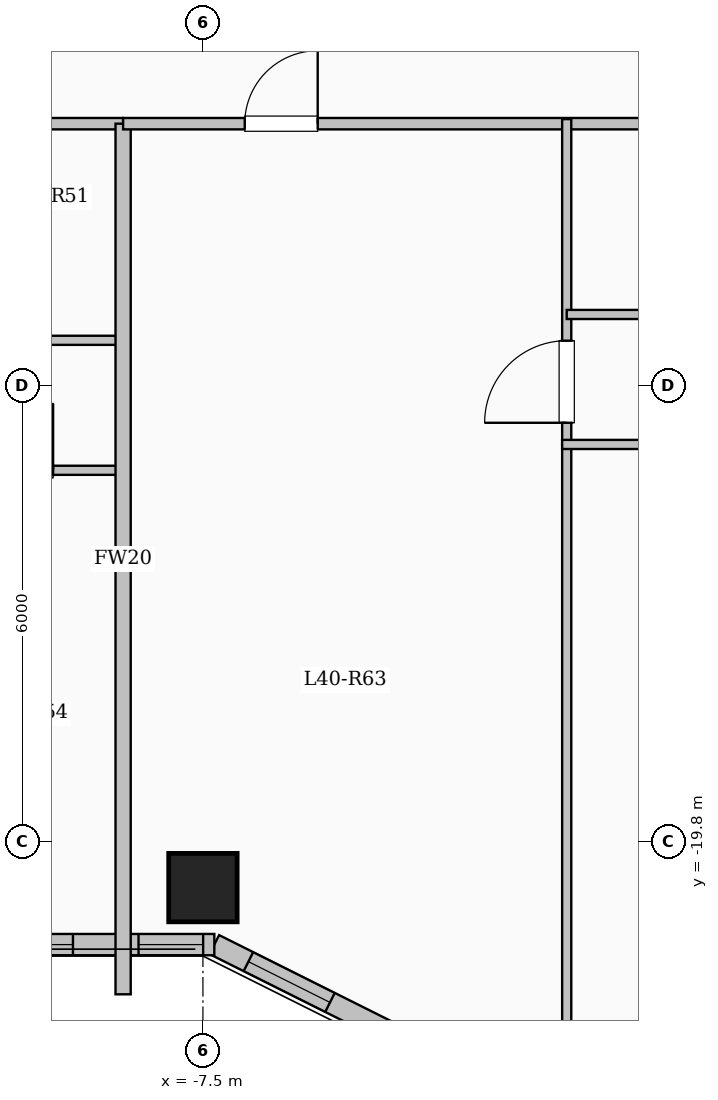
"""IFC4 building model, lengths in metres.
Left out: names, types, materials, properties, quantities, classifications, styles, units other than length and angle.
Written with IfcOpenShell. Run it as: python <this file> out.ifc"""

import sys

from ifc_helpers import new_model, si_unit, direction, frame, frame_2d, origin, origin_2d, place, context, subcontext, project, spatial, rectangle, extrude, element, fill, save


model = new_model("IFC4")
c1 = context("Model", 3, precision=1e-05, world=origin(), true_north=direction((0.0, 1.0)))
c2 = subcontext(c1, "Body", "Model", "MODEL_VIEW")
j1 = project(units=[si_unit("LENGTHUNIT", "METRE"), si_unit("PLANEANGLEUNIT", "RADIAN")], contexts=[c1])
p1 = place(None, origin())
s1 = spatial("IfcSite", under=j1, at=p1, CompositionType="ELEMENT")
p2 = place(p1, origin())
s2 = spatial("IfcBuilding", under=s1, at=p2, CompositionType="ELEMENT")
p3 = place(p2, frame((0.0, 0.0, 149.35)))
s3 = spatial("IfcBuildingStorey", under=s2, at=p3, CompositionType="ELEMENT", Elevation=149.35)
p4 = place(p3, frame((-7.5, -20.4, 0.0), z_axis=(0.0, 0.0, 1.0), x_axis=(1.0, 0.0, 0.0)))
e1 = element("IfcColumn", 1, at=p4, inside=s3, PredefinedType="COLUMN", context=c2, shape_type="SweptSolid", body=[
    extrude(rectangle(XDim=0.9, YDim=0.9, at=origin_2d()), origin(), (0.0, 0.0, 1.0), 3.35),
])
p5 = place(p3, frame((-4.35, -22.65, 0.0), z_axis=(0.0, 0.0, 1.0), x_axis=(-0.894427191, 0.4472135955, 0.0)))
e2 = element("IfcWall", 2, at=p5, inside=s3, PredefinedType="SOLIDWALL", context=c2, shape_type="SweptSolid", body=[
    extrude(rectangle(XDim=3.354, YDim=0.28, at=frame_2d((1.677, 0.0))), origin(), (0.0, 0.0, 1.0), 3.1),
])
p6 = place(p5, frame((1.653, 0.0, 0.95)))
e3 = element("IfcOpeningElement", 3, at=p6, cuts=e2, PredefinedType="OPENING", context=c2, shape_type="SweptSolid", body=[
    extrude(rectangle(XDim=1.2, YDim=1.5, at=frame_2d((0.6, 0.75))), frame((0.0, 0.15, 0.0), z_axis=(0.0, -1.0, 0.0), x_axis=(1.0, 0.0, 0.0)), (0.0, 0.0, 1.0), 0.3),
])
p7 = place(p3, frame((-7.35, -21.15, 0.0), z_axis=(0.0, 0.0, 1.0), x_axis=(-1.0, 0.0, 0.0)))
e4 = element("IfcWall", 4, at=p7, inside=s3, PredefinedType="SOLIDWALL", context=c2, shape_type="SweptSolid", body=[
    extrude(rectangle(XDim=12.3, YDim=0.28, at=frame_2d((6.15, 0.0))), origin(), (0.0, 0.0, 1.0), 3.1),
])
p8 = place(p7, frame((0.147, 0.0, 0.95)))
e5 = element("IfcOpeningElement", 5, at=p8, cuts=e4, PredefinedType="OPENING", context=c2, shape_type="SweptSolid", body=[
    extrude(rectangle(XDim=0.85, YDim=1.5, at=frame_2d((0.425, 0.75))), frame((0.0, 0.15, 0.0), z_axis=(0.0, -1.0, 0.0), x_axis=(1.0, 0.0, 0.0)), (0.0, 0.0, 1.0), 0.3),
])
p9 = place(p7, frame((1.86, 0.0, 0.95)))
e6 = element("IfcOpeningElement", 6, at=p9, cuts=e4, PredefinedType="OPENING", context=c2, shape_type="SweptSolid", body=[
    extrude(rectangle(XDim=1.2, YDim=1.5, at=frame_2d((0.6, 0.75))), frame((0.0, 0.15, 0.0), z_axis=(0.0, -1.0, 0.0), x_axis=(1.0, 0.0, 0.0)), (0.0, 0.0, 1.0), 0.3),
])
p10 = place(p7, frame((4.295, 0.0, 0.95)))
e7 = element("IfcOpeningElement", 7, at=p10, cuts=e4, PredefinedType="OPENING", context=c2, shape_type="SweptSolid", body=[
    extrude(rectangle(XDim=1.2, YDim=1.5, at=frame_2d((0.6, 0.75))), frame((0.0, 0.15, 0.0), z_axis=(0.0, -1.0, 0.0), x_axis=(1.0, 0.0, 0.0)), (0.0, 0.0, 1.0), 0.3),
])
p11 = place(p7, frame((6.655, 0.0, 0.95)))
e8 = element("IfcOpeningElement", 8, at=p11, cuts=e4, PredefinedType="OPENING", context=c2, shape_type="SweptSolid", body=[
    extrude(rectangle(XDim=1.2, YDim=1.5, at=frame_2d((0.6, 0.75))), frame((0.0, 0.15, 0.0), z_axis=(0.0, -1.0, 0.0), x_axis=(1.0, 0.0, 0.0)), (0.0, 0.0, 1.0), 0.3),
])
p12 = place(p7, frame((9.517, 0.0, 0.9)))
e9 = element("IfcOpeningElement", 9, at=p12, cuts=e4, PredefinedType="OPENING", context=c2, shape_type="SweptSolid", body=[
    extrude(rectangle(XDim=1.65, YDim=1.6, at=frame_2d((0.825, 0.8))), frame((0.0, 0.15, 0.0), z_axis=(0.0, -1.0, 0.0), x_axis=(1.0, 0.0, 0.0)), (0.0, 0.0, 1.0), 0.3),
])
p13 = place(p3, frame((-19.55, -10.35, 0.0), z_axis=(0.0, 0.0, 1.0), x_axis=(1.0, 0.0, 0.0)))
e10 = element("IfcWall", 10, at=p13, inside=s3, PredefinedType="PARTITIONING", context=c2, shape_type="SweptSolid", body=[
    extrude(rectangle(XDim=11.0, YDim=0.15, at=frame_2d((5.5, 0.0))), origin(), (0.0, 0.0, 1.0), 3.1),
])
p14 = place(p13, frame((0.7, 0.0, 0.0)))
e11 = element("IfcOpeningElement", 11, at=p14, cuts=e10, PredefinedType="OPENING", context=c2, shape_type="SweptSolid", body=[
    extrude(rectangle(XDim=0.96, YDim=2.15, at=frame_2d((0.48, 1.075))), frame((0.0, 0.085, 0.0), z_axis=(0.0, -1.0, 0.0), x_axis=(1.0, 0.0, 0.0)), (0.0, 0.0, 1.0), 0.17),
])
p15 = place(p3, frame((-12.305, -13.2, 0.0), z_axis=(0.0, 0.0, 1.0), x_axis=(1.0, 0.0, 0.0)))
e12 = element("IfcWall", 12, at=p15, inside=s3, PredefinedType="PARTITIONING", context=c2, shape_type="SweptSolid", body=[
    extrude(rectangle(XDim=3.705, YDim=0.12, at=frame_2d((1.853, 0.0))), origin(), (0.0, 0.0, 1.0), 3.1),
])
p16 = place(p15, frame((1.413, 0.0, 0.0)))
e13 = element("IfcOpeningElement", 13, at=p16, cuts=e12, PredefinedType="OPENING", context=c2, shape_type="SweptSolid", body=[
    extrude(rectangle(XDim=0.88, YDim=2.1, at=frame_2d((0.44, 1.05))), frame((0.0, 0.07, 0.0), z_axis=(0.0, -1.0, 0.0), x_axis=(1.0, 0.0, 0.0)), (0.0, 0.0, 1.0), 0.14),
])
p17 = place(p3, frame((-15.868, -14.91, 0.0), z_axis=(0.0, 0.0, 1.0), x_axis=(1.0, 0.0, 0.0)))
e14 = element("IfcWall", 14, at=p17, inside=s3, PredefinedType="PARTITIONING", context=c2, shape_type="SweptSolid", body=[
    extrude(rectangle(XDim=7.328, YDim=0.12, at=frame_2d((3.664, 0.0))), origin(), (0.0, 0.0, 1.0), 3.1),
])
p18 = place(p17, frame((0.751, 0.0, 0.0)))
e15 = element("IfcOpeningElement", 15, at=p18, cuts=e14, PredefinedType="OPENING", context=c2, shape_type="SweptSolid", body=[
    extrude(rectangle(XDim=0.88, YDim=2.1, at=frame_2d((0.44, 1.05))), frame((0.0, 0.07, 0.0), z_axis=(0.0, -1.0, 0.0), x_axis=(1.0, 0.0, 0.0)), (0.0, 0.0, 1.0), 0.14),
])
p19 = place(p17, frame((3.134, 0.0, 0.0)))
e16 = element("IfcOpeningElement", 16, at=p19, cuts=e14, PredefinedType="OPENING", context=c2, shape_type="SweptSolid", body=[
    extrude(rectangle(XDim=0.88, YDim=2.1, at=frame_2d((0.44, 1.05))), frame((0.0, 0.07, 0.0), z_axis=(0.0, -1.0, 0.0), x_axis=(1.0, 0.0, 0.0)), (0.0, 0.0, 1.0), 0.14),
])
p20 = place(p17, frame((5.517, 0.0, 0.0)))
e17 = element("IfcOpeningElement", 17, at=p20, cuts=e14, PredefinedType="OPENING", context=c2, shape_type="SweptSolid", body=[
    extrude(rectangle(XDim=0.88, YDim=2.1, at=frame_2d((0.44, 1.05))), frame((0.0, 0.07, 0.0), z_axis=(0.0, -1.0, 0.0), x_axis=(1.0, 0.0, 0.0)), (0.0, 0.0, 1.0), 0.14),
])
p21 = place(p3, frame((-8.55, -21.804, 0.0), z_axis=(0.0, 0.0, 1.0), x_axis=(0.0, 1.0, 0.0)))
e18 = element("IfcWall", 18, at=p21, inside=s3, PredefinedType="SOLIDWALL", context=c2, shape_type="SweptSolid", body=[
    extrude(rectangle(XDim=11.454, YDim=0.2, at=frame_2d((5.727, 0.0))), origin(), (0.0, 0.0, 1.0), 3.1),
])
p22 = place(p3, frame((-8.55, -10.35, 0.0), z_axis=(0.0, 0.0, 1.0), x_axis=(1.0, 0.0, 0.0)))
e19 = element("IfcWall", 19, at=p22, inside=s3, PredefinedType="PARTITIONING", context=c2, shape_type="SweptSolid", body=[
    extrude(rectangle(XDim=17.1, YDim=0.15, at=frame_2d((8.55, 0.0))), origin(), (0.0, 0.0, 1.0), 3.1),
])
p23 = place(p22, frame((1.6, 0.0, 0.0)))
e20 = element("IfcOpeningElement", 20, at=p23, cuts=e19, PredefinedType="OPENING", context=c2, shape_type="SweptSolid", body=[
    extrude(rectangle(XDim=0.96, YDim=2.15, at=frame_2d((0.48, 1.075))), frame((0.0, 0.085, 0.0), z_axis=(0.0, -1.0, 0.0), x_axis=(1.0, 0.0, 0.0)), (0.0, 0.0, 1.0), 0.17),
])
p24 = place(p3, frame((-2.714, -22.68, 0.0), z_axis=(0.0, 0.0, 1.0), x_axis=(0.0, 1.0, 0.0)))
e21 = element("IfcWall", 21, at=p24, inside=s3, PredefinedType="PARTITIONING", context=c2, shape_type="SweptSolid", body=[
    extrude(rectangle(XDim=12.39, YDim=0.12, at=frame_2d((6.195, 0.0))), origin(), (0.0, 0.0, 1.0), 3.1),
])
p25 = place(p24, frame((8.395, 0.0, 0.0)))
e22 = element("IfcOpeningElement", 22, at=p25, cuts=e21, PredefinedType="OPENING", context=c2, shape_type="SweptSolid", body=[
    extrude(rectangle(XDim=1.08, YDim=2.15, at=frame_2d((0.54, 1.075))), frame((0.0, 0.07, 0.0), z_axis=(0.0, -1.0, 0.0), x_axis=(1.0, 0.0, 0.0)), (0.0, 0.0, 1.0), 0.14),
])
p26 = place(p3, frame((-2.714, -12.86, 0.0), z_axis=(0.0, 0.0, 1.0), x_axis=(1.0, 0.0, 0.0)))
e23 = element("IfcWall", 23, at=p26, inside=s3, PredefinedType="PARTITIONING", context=c2, shape_type="SweptSolid", body=[
    extrude(rectangle(XDim=6.381, YDim=0.12, at=frame_2d((3.19, 0.0))), origin(), (0.0, 0.0, 1.0), 3.1),
])
p27 = place(p26, frame((2.751, 0.0, 0.0)))
e24 = element("IfcOpeningElement", 24, at=p27, cuts=e23, PredefinedType="OPENING", context=c2, shape_type="SweptSolid", body=[
    extrude(rectangle(XDim=0.88, YDim=2.1, at=frame_2d((0.44, 1.05))), frame((0.0, 0.07, 0.0), z_axis=(0.0, -1.0, 0.0), x_axis=(1.0, 0.0, 0.0)), (0.0, 0.0, 1.0), 0.14),
])
p28 = place(p3, frame((-2.774, -14.57, 0.0), z_axis=(0.0, 0.0, 1.0), x_axis=(1.0, 0.0, 0.0)))
e25 = element("IfcWall", 25, at=p28, inside=s3, PredefinedType="PARTITIONING", context=c2, shape_type="SweptSolid", body=[
    extrude(rectangle(XDim=11.384, YDim=0.12, at=frame_2d((5.692, 0.0))), origin(), (0.0, 0.0, 1.0), 3.1),
])
p29 = place(p28, frame((1.426, 0.0, 0.0)))
e26 = element("IfcOpeningElement", 26, at=p29, cuts=e25, PredefinedType="OPENING", context=c2, shape_type="SweptSolid", body=[
    extrude(rectangle(XDim=0.88, YDim=2.1, at=frame_2d((0.44, 1.05))), frame((0.0, 0.07, 0.0), z_axis=(0.0, -1.0, 0.0), x_axis=(1.0, 0.0, 0.0)), (0.0, 0.0, 1.0), 0.14),
])
p30 = place(p28, frame((5.157, 0.0, 0.0)))
e27 = element("IfcOpeningElement", 27, at=p30, cuts=e25, PredefinedType="OPENING", context=c2, shape_type="SweptSolid", body=[
    extrude(rectangle(XDim=0.88, YDim=2.1, at=frame_2d((0.44, 1.05))), frame((0.0, 0.07, 0.0), z_axis=(0.0, -1.0, 0.0), x_axis=(1.0, 0.0, 0.0)), (0.0, 0.0, 1.0), 0.14),
])
p31 = place(p28, frame((8.888, 0.0, 0.0)))
e28 = element("IfcOpeningElement", 28, at=p31, cuts=e25, PredefinedType="OPENING", context=c2, shape_type="SweptSolid", body=[
    extrude(rectangle(XDim=0.88, YDim=2.1, at=frame_2d((0.44, 1.05))), frame((0.0, 0.07, 0.0), z_axis=(0.0, -1.0, 0.0), x_axis=(1.0, 0.0, 0.0)), (0.0, 0.0, 1.0), 0.14),
])
p32 = place(p6, origin())
e29 = element("IfcWindow", 29, at=p32, inside=s3, PartitioningType="SINGLE_PANEL", PredefinedType="WINDOW", context=c2, shape_type="SweptSolid", body=[
    extrude(rectangle(XDim=1.2, YDim=1.5, at=frame_2d((0.6, 0.75))), frame((0.0, 0.03, 0.0), z_axis=(0.0, -1.0, 0.0), x_axis=(1.0, 0.0, 0.0)), (0.0, 0.0, 1.0), 0.06),
])
fill(e3, e29)
p33 = place(p8, origin())
e30 = element("IfcWindow", 30, at=p33, inside=s3, PartitioningType="SINGLE_PANEL", PredefinedType="WINDOW", context=c2, shape_type="SweptSolid", body=[
    extrude(rectangle(XDim=0.85, YDim=1.5, at=frame_2d((0.425, 0.75))), frame((0.0, 0.03, 0.0), z_axis=(0.0, -1.0, 0.0), x_axis=(1.0, 0.0, 0.0)), (0.0, 0.0, 1.0), 0.06),
])
fill(e5, e30)
p34 = place(p9, origin())
e31 = element("IfcWindow", 31, at=p34, inside=s3, PartitioningType="SINGLE_PANEL", PredefinedType="WINDOW", context=c2, shape_type="SweptSolid", body=[
    extrude(rectangle(XDim=1.2, YDim=1.5, at=frame_2d((0.6, 0.75))), frame((0.0, 0.03, 0.0), z_axis=(0.0, -1.0, 0.0), x_axis=(1.0, 0.0, 0.0)), (0.0, 0.0, 1.0), 0.06),
])
fill(e6, e31)
p35 = place(p20, origin())
e32 = element("IfcDoor", 32, at=p35, inside=s3, OperationType="SINGLE_SWING_RIGHT", PredefinedType="DOOR", context=c2, shape_type="SweptSolid", body=[
    extrude(rectangle(XDim=0.88, YDim=2.1, at=frame_2d((0.44, 1.05))), frame((0.0, 0.025, 0.0), z_axis=(0.0, -1.0, 0.0), x_axis=(1.0, 0.0, 0.0)), (0.0, 0.0, 1.0), 0.05),
])
fill(e17, e32)
p36 = place(p23, origin())
e33 = element("IfcDoor", 33, at=p36, inside=s3, OperationType="SINGLE_SWING_RIGHT", PredefinedType="DOOR", context=c2, shape_type="SweptSolid", body=[
    extrude(rectangle(XDim=0.96, YDim=2.15, at=frame_2d((0.48, 1.075))), frame((0.0, 0.025, 0.0), z_axis=(0.0, -1.0, 0.0), x_axis=(1.0, 0.0, 0.0)), (0.0, 0.0, 1.0), 0.05),
])
fill(e20, e33)
p37 = place(p25, origin())
e34 = element("IfcDoor", 34, at=p37, inside=s3, OperationType="SINGLE_SWING_LEFT", PredefinedType="DOOR", context=c2, shape_type="SweptSolid", body=[
    extrude(rectangle(XDim=1.08, YDim=2.15, at=frame_2d((0.54, 1.075))), frame((0.0, 0.025, 0.0), z_axis=(0.0, -1.0, 0.0), x_axis=(1.0, 0.0, 0.0)), (0.0, 0.0, 1.0), 0.05),
])
fill(e22, e34)
save(model, sys.argv[1])
